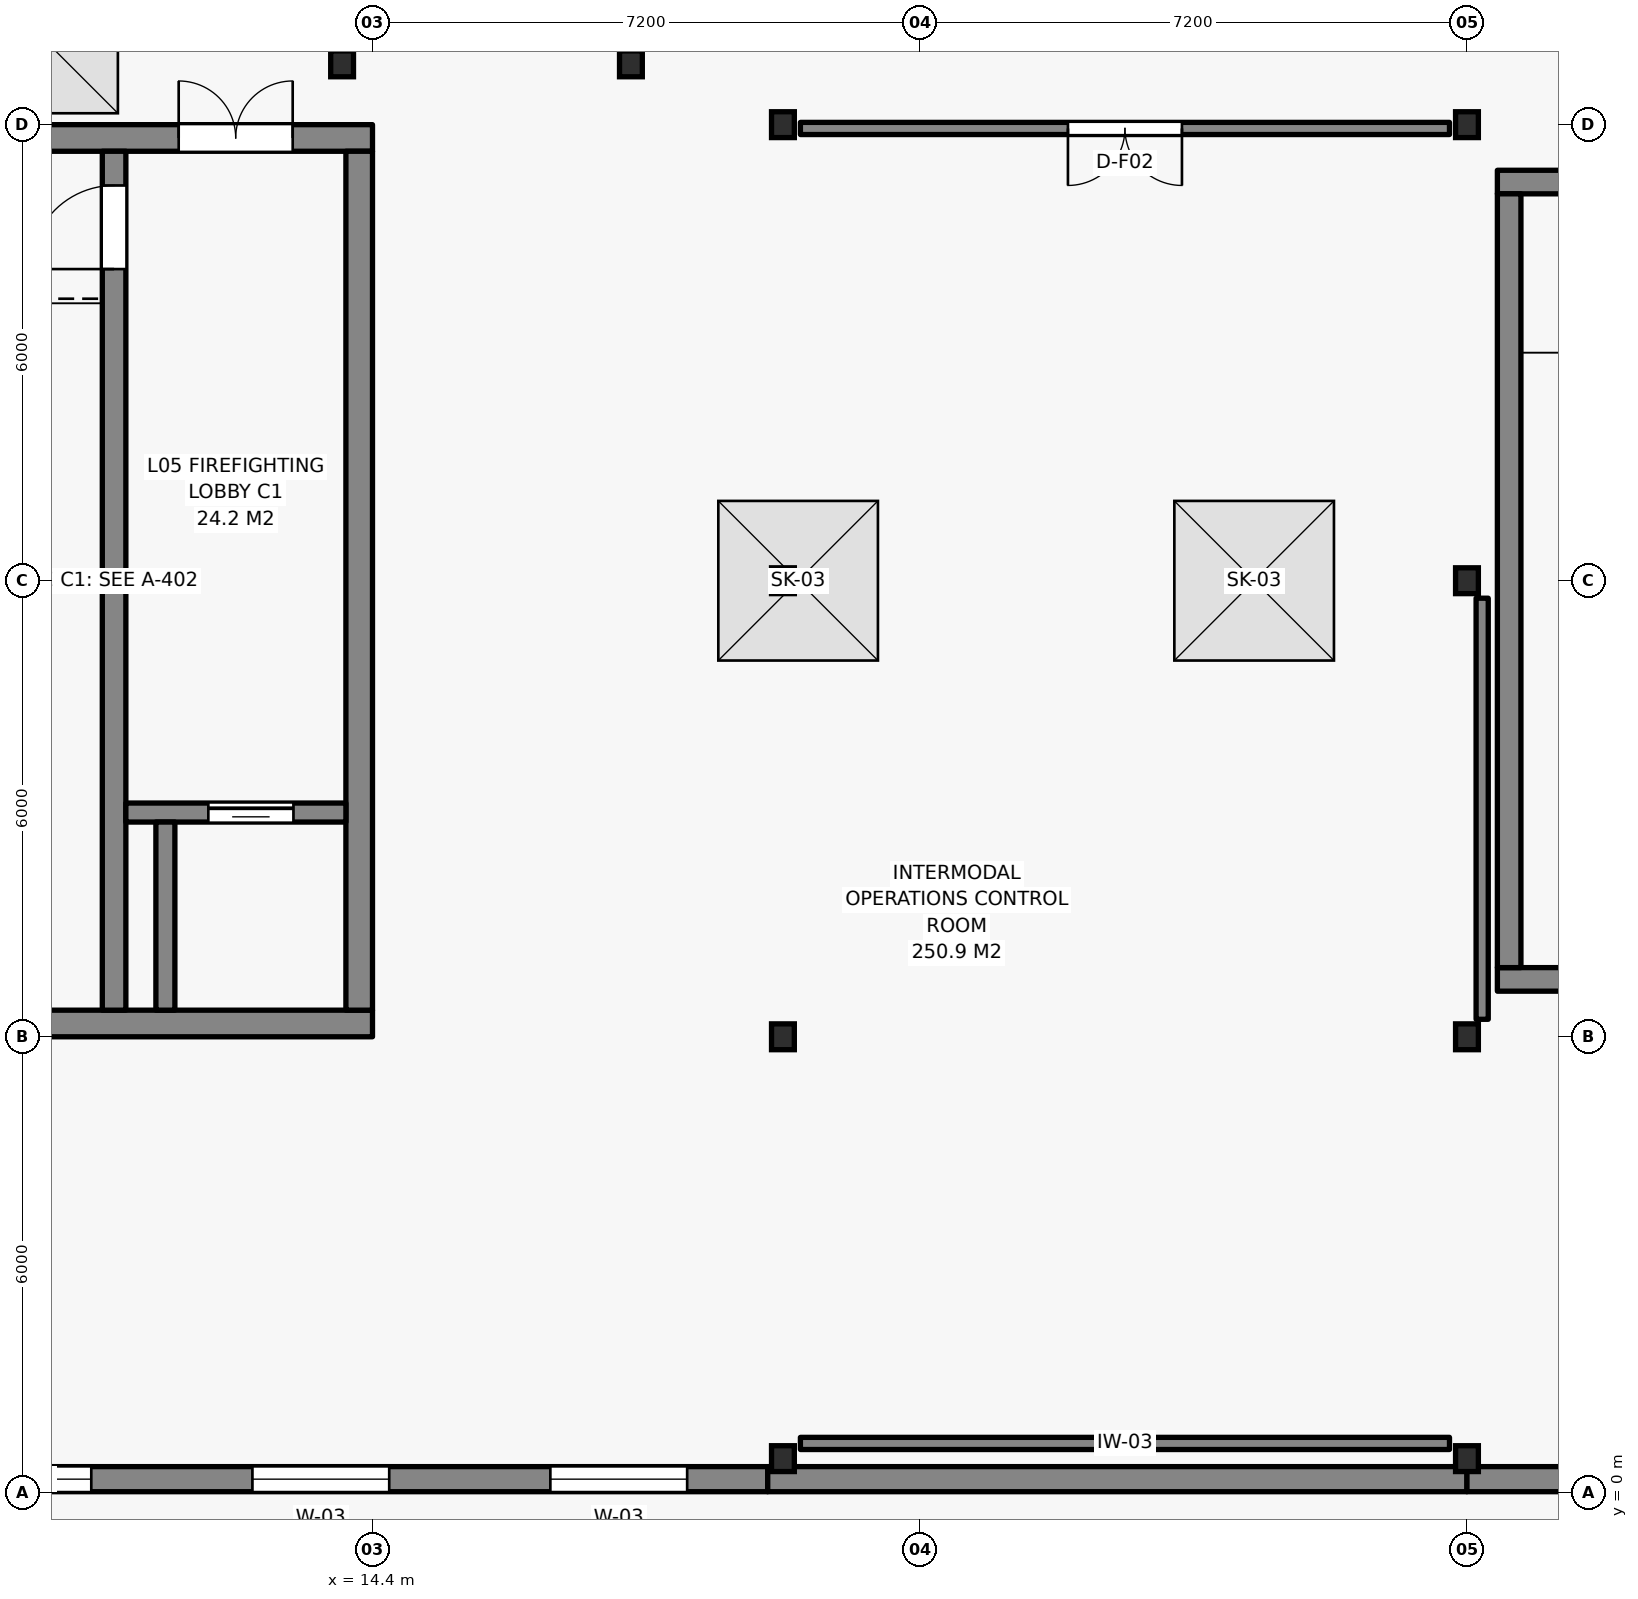
"""IFC4 building model, lengths in metres.
Left out: names, types, materials, properties, quantities, classifications, styles, units other than length and angle.
Written with IfcOpenShell. Run it as: python <this file> out.ifc"""

import sys

from ifc_helpers import new_model, si_unit, direction, frame, frame_2d, origin, origin_2d, place, context, subcontext, project, spatial, rectangle, i_section, extrude, element, fill, save


model = new_model("IFC4")
c1 = context("Model", 3, precision=1e-05, world=origin(), true_north=direction((0.0, 1.0)))
c2 = subcontext(c1, "Body", "Model", "MODEL_VIEW")
j1 = project(units=[si_unit("LENGTHUNIT", "METRE"), si_unit("PLANEANGLEUNIT", "RADIAN")], contexts=[c1])
p1 = place(None, origin())
s1 = spatial("IfcSite", under=j1, at=p1, CompositionType="ELEMENT")
p2 = place(p1, origin())
s2 = spatial("IfcBuilding", under=s1, at=p2, CompositionType="ELEMENT")
p3 = place(p2, frame((0.0, 0.0, 18.75)))
s3 = spatial("IfcBuildingStorey", under=s2, at=p3, CompositionType="ELEMENT", Elevation=18.75)
p4 = place(p3, frame((7.2, 6.175, 0.0), z_axis=(0.0, 0.0, 1.0), x_axis=(1.0, 0.0, 0.0)))
e1 = element("IfcWall", 1, at=p4, inside=s3, PredefinedType="SHEAR", context=c2, shape_type="SweptSolid", body=[
    extrude(rectangle(XDim=7.2, YDim=0.35, at=frame_2d((3.6, 0.0))), origin(), (0.0, 0.0, 1.0), 3.71),
])
p5 = place(p3, frame((7.2, 17.825, 0.0), z_axis=(0.0, 0.0, 1.0), x_axis=(1.0, 0.0, 0.0)))
e2 = element("IfcWall", 2, at=p5, inside=s3, PredefinedType="SHEAR", context=c2, shape_type="SweptSolid", body=[
    extrude(rectangle(XDim=7.2, YDim=0.35, at=frame_2d((3.6, 0.0))), origin(), (0.0, 0.0, 1.0), 3.71),
])
p6 = place(p5, frame((4.65, 0.0, 0.0)))
e3 = element("IfcOpeningElement", 3, at=p6, cuts=e2, PredefinedType="OPENING", context=c2, shape_type="SweptSolid", body=[
    extrude(rectangle(XDim=1.5, YDim=2.15, at=frame_2d((0.75, 1.075))), frame((0.0, 0.185, 0.0), z_axis=(0.0, -1.0, 0.0), x_axis=(1.0, 0.0, 0.0)), (0.0, 0.0, 1.0), 0.37),
])
p7 = place(p3, frame((14.225, 6.35, 0.0), z_axis=(0.0, 0.0, 1.0), x_axis=(0.0, 1.0, 0.0)))
e4 = element("IfcWall", 4, at=p7, inside=s3, PredefinedType="SHEAR", context=c2, shape_type="SweptSolid", body=[
    extrude(rectangle(XDim=11.3, YDim=0.35, at=frame_2d((5.65, 0.0))), origin(), (0.0, 0.0, 1.0), 3.71),
])
p8 = place(p3, frame((11.0, 6.35, 0.0), z_axis=(0.0, 0.0, 1.0), x_axis=(0.0, 1.0, 0.0)))
e5 = element("IfcWall", 5, at=p8, inside=s3, PredefinedType="SHEAR", context=c2, shape_type="SweptSolid", body=[
    extrude(rectangle(XDim=11.3, YDim=0.31, at=frame_2d((5.65, 0.0))), origin(), (0.0, 0.0, 1.0), 3.71),
])
p9 = place(p8, frame((9.75, 0.0, 0.0)))
e6 = element("IfcOpeningElement", 6, at=p9, cuts=e5, PredefinedType="OPENING", context=c2, shape_type="SweptSolid", body=[
    extrude(rectangle(XDim=1.1, YDim=2.15, at=frame_2d((0.55, 1.075))), frame((0.0, 0.165, 0.0), z_axis=(0.0, -1.0, 0.0), x_axis=(1.0, 0.0, 0.0)), (0.0, 0.0, 1.0), 0.33),
])
p10 = place(p3, frame((29.2, 6.755, 0.0), z_axis=(0.0, 0.0, 1.0), x_axis=(1.0, 0.0, 0.0)))
e7 = element("IfcWall", 7, at=p10, inside=s3, PredefinedType="SHEAR", context=c2, shape_type="SweptSolid", body=[
    extrude(rectangle(XDim=4.8, YDim=0.31, at=frame_2d((2.4, 0.0))), origin(), (0.0, 0.0, 1.0), 3.71),
])
p11 = place(p3, frame((29.2, 17.245, 0.0), z_axis=(0.0, 0.0, 1.0), x_axis=(1.0, 0.0, 0.0)))
e8 = element("IfcWall", 8, at=p11, inside=s3, PredefinedType="SHEAR", context=c2, shape_type="SweptSolid", body=[
    extrude(rectangle(XDim=4.8, YDim=0.31, at=frame_2d((2.4, 0.0))), origin(), (0.0, 0.0, 1.0), 3.71),
])
p12 = place(p11, frame((1.5, 0.0, 0.0)))
e9 = element("IfcOpeningElement", 9, at=p12, cuts=e8, PredefinedType="OPENING", context=c2, shape_type="SweptSolid", body=[
    extrude(rectangle(XDim=1.8, YDim=2.15, at=frame_2d((0.9, 1.075))), frame((0.0, 0.165, 0.0), z_axis=(0.0, -1.0, 0.0), x_axis=(1.0, 0.0, 0.0)), (0.0, 0.0, 1.0), 0.33),
])
p13 = place(p3, frame((29.355, 6.91, 0.0), z_axis=(0.0, 0.0, 1.0), x_axis=(0.0, 1.0, 0.0)))
e10 = element("IfcWall", 10, at=p13, inside=s3, PredefinedType="SHEAR", context=c2, shape_type="SweptSolid", body=[
    extrude(rectangle(XDim=10.18, YDim=0.31, at=frame_2d((5.09, 0.0))), origin(), (0.0, 0.0, 1.0), 3.71),
])
for number, where, z_axis, x_axis in (
    (11, (19.8, 0.45, 0.0), (0.0, 0.0, 1.0), (1.0, 0.0, 0.0)),
    (12, (19.8, 6.0, 0.0), (0.0, 0.0, 1.0), (1.0, 0.0, 0.0)),
    (13, (19.8, 12.0, 0.0), (0.0, 0.0, 1.0), (1.0, 0.0, 0.0)),
    (14, (19.8, 18.0, 0.0), (0.0, 0.0, 1.0), (1.0, 0.0, 0.0)),
    (15, (28.8, 0.45, 0.0), (0.0, 0.0, 1.0), (1.0, 0.0, 0.0)),
    (16, (28.8, 6.0, 0.0), (0.0, 0.0, 1.0), (1.0, 0.0, 0.0)),
    (17, (28.8, 12.0, 0.0), (0.0, 0.0, 1.0), (1.0, 0.0, 0.0)),
    (18, (28.8, 18.0, 0.0), (0.0, 0.0, 1.0), (1.0, 0.0, 0.0)),
    (19, (14.0, 18.8, 0.0), (0.0, 0.0, 1.0), (1.0, 0.0, 0.0)),
    (20, (17.8, 18.8, 0.0), (0.0, 0.0, 1.0), (1.0, 0.0, 0.0)),
):
    element("IfcColumn", number, at=place(p3, frame(where, z_axis=z_axis, x_axis=x_axis)), inside=s3, PredefinedType="COLUMN", context=c2, shape_type="SweptSolid", body=[
        extrude(i_section(OverallWidth=0.3, OverallDepth=0.34, WebThickness=0.012, FlangeThickness=0.021, FilletRadius=0.027, at=origin_2d()), origin(), (0.0, 0.0, 1.0), 3.71),
    ])
p14 = place(p3, frame((0.0, 0.18, 0.0), z_axis=(0.0, 0.0, 1.0), x_axis=(1.0, 0.0, 0.0)))
e21 = element("IfcWall", 21, at=p14, inside=s3, PredefinedType="SOLIDWALL", context=c2, shape_type="SweptSolid", body=[
    extrude(rectangle(XDim=19.6, YDim=0.33, at=frame_2d((9.8, 0.0))), origin(), (0.0, 0.0, 1.0), 3.505),
])
p15 = place(p14, frame((1.06, 0.0, 0.915)))
e22 = element("IfcOpeningElement", 22, at=p15, cuts=e21, PredefinedType="OPENING", context=c2, shape_type="SweptSolid", body=[
    extrude(rectangle(XDim=1.8, YDim=2.35, at=frame_2d((0.9, 1.175))), frame((0.0, 0.175, 0.0), z_axis=(0.0, -1.0, 0.0), x_axis=(1.0, 0.0, 0.0)), (0.0, 0.0, 1.0), 0.35),
])
p16 = place(p14, frame((8.9, 0.0, 0.915)))
e23 = element("IfcOpeningElement", 23, at=p16, cuts=e21, PredefinedType="OPENING", context=c2, shape_type="SweptSolid", body=[
    extrude(rectangle(XDim=1.8, YDim=2.35, at=frame_2d((0.9, 1.175))), frame((0.0, 0.175, 0.0), z_axis=(0.0, -1.0, 0.0), x_axis=(1.0, 0.0, 0.0)), (0.0, 0.0, 1.0), 0.35),
])
p17 = place(p14, frame((12.82, 0.0, 0.915)))
e24 = element("IfcOpeningElement", 24, at=p17, cuts=e21, PredefinedType="OPENING", context=c2, shape_type="SweptSolid", body=[
    extrude(rectangle(XDim=1.8, YDim=2.35, at=frame_2d((0.9, 1.175))), frame((0.0, 0.175, 0.0), z_axis=(0.0, -1.0, 0.0), x_axis=(1.0, 0.0, 0.0)), (0.0, 0.0, 1.0), 0.35),
])
p18 = place(p14, frame((16.74, 0.0, 0.915)))
e25 = element("IfcOpeningElement", 25, at=p18, cuts=e21, PredefinedType="OPENING", context=c2, shape_type="SweptSolid", body=[
    extrude(rectangle(XDim=1.8, YDim=2.35, at=frame_2d((0.9, 1.175))), frame((0.0, 0.175, 0.0), z_axis=(0.0, -1.0, 0.0), x_axis=(1.0, 0.0, 0.0)), (0.0, 0.0, 1.0), 0.35),
])
p19 = place(p3, frame((19.6, 0.18, 0.0), z_axis=(0.0, 0.0, 1.0), x_axis=(1.0, 0.0, 0.0)))
e26 = element("IfcWall", 26, at=p19, inside=s3, PredefinedType="SOLIDWALL", context=c2, shape_type="SweptSolid", body=[
    extrude(rectangle(XDim=9.2, YDim=0.33, at=frame_2d((4.6, 0.0))), origin(), (0.0, 0.0, 1.0), 3.205),
])
p20 = place(p3, frame((28.8, 0.18, 0.0), z_axis=(0.0, 0.0, 1.0), x_axis=(1.0, 0.0, 0.0)))
e27 = element("IfcWall", 27, at=p20, inside=s3, PredefinedType="SOLIDWALL", context=c2, shape_type="SweptSolid", body=[
    extrude(rectangle(XDim=7.2, YDim=0.33, at=frame_2d((3.6, 0.0))), origin(), (0.0, 0.0, 1.0), 3.71),
])
p21 = place(p20, frame((2.7, 0.0, 1.12)))
e28 = element("IfcOpeningElement", 28, at=p21, cuts=e27, PredefinedType="OPENING", context=c2, shape_type="SweptSolid", body=[
    extrude(rectangle(XDim=1.8, YDim=2.35, at=frame_2d((0.9, 1.175))), frame((0.0, 0.175, 0.0), z_axis=(0.0, -1.0, 0.0), x_axis=(1.0, 0.0, 0.0)), (0.0, 0.0, 1.0), 0.35),
])
p22 = place(p3, frame((11.155, 8.95, 0.0), z_axis=(0.0, 0.0, 1.0), x_axis=(1.0, 0.0, 0.0)))
e29 = element("IfcWall", 29, at=p22, inside=s3, PredefinedType="SHEAR", context=c2, shape_type="SweptSolid", body=[
    extrude(rectangle(XDim=2.895, YDim=0.25, at=frame_2d((1.448, 0.0))), origin(), (0.0, 0.0, 1.0), 3.71),
])
p23 = place(p22, frame((1.085, 0.0, 0.0)))
e30 = element("IfcOpeningElement", 30, at=p23, cuts=e29, PredefinedType="OPENING", context=c2, shape_type="SweptSolid", body=[
    extrude(rectangle(XDim=1.12, YDim=2.15, at=frame_2d((0.56, 1.075))), frame((0.0, 0.135, 0.0), z_axis=(0.0, -1.0, 0.0), x_axis=(1.0, 0.0, 0.0)), (0.0, 0.0, 1.0), 0.27),
])
p24 = place(p3, frame((11.675, 6.35, 0.0), z_axis=(0.0, 0.0, 1.0), x_axis=(0.0, 1.0, 0.0)))
e31 = element("IfcWall", 31, at=p24, inside=s3, PredefinedType="SHEAR", context=c2, shape_type="SweptSolid", body=[
    extrude(rectangle(XDim=2.475, YDim=0.25, at=frame_2d((1.237, 0.0))), origin(), (0.0, 0.0, 1.0), 3.71),
])
p25 = place(p3, frame((20.03, 0.65, 0.0), z_axis=(0.0, 0.0, 1.0), x_axis=(1.0, 0.0, 0.0)))
e32 = element("IfcWall", 32, at=p25, inside=s3, PredefinedType="PARTITIONING", context=c2, shape_type="SweptSolid", body=[
    extrude(rectangle(XDim=8.54, YDim=0.16, at=frame_2d((4.27, 0.0))), origin(), (0.0, 0.0, 1.0), 3.205),
])
p26 = place(p3, frame((29.0, 6.23, 0.0), z_axis=(0.0, 0.0, 1.0), x_axis=(0.0, 1.0, 0.0)))
e33 = element("IfcWall", 33, at=p26, inside=s3, PredefinedType="PARTITIONING", context=c2, shape_type="SweptSolid", body=[
    extrude(rectangle(XDim=5.54, YDim=0.16, at=frame_2d((2.77, 0.0))), origin(), (0.0, 0.0, 1.0), 3.205),
])
p27 = place(p3, frame((28.57, 17.95, 0.0), z_axis=(0.0, 0.0, 1.0), x_axis=(-1.0, 0.0, 0.0)))
e34 = element("IfcWall", 34, at=p27, inside=s3, PredefinedType="PARTITIONING", context=c2, shape_type="SweptSolid", body=[
    extrude(rectangle(XDim=8.54, YDim=0.16, at=frame_2d((4.27, 0.0))), origin(), (0.0, 0.0, 1.0), 3.205),
])
p28 = place(p27, frame((3.52, 0.0, 0.0)))
e35 = element("IfcOpeningElement", 35, at=p28, cuts=e34, PredefinedType="OPENING", context=c2, shape_type="SweptSolid", body=[
    extrude(rectangle(XDim=1.5, YDim=2.15, at=frame_2d((0.75, 1.075))), frame((0.0, 0.09, 0.0), z_axis=(0.0, -1.0, 0.0), x_axis=(1.0, 0.0, 0.0)), (0.0, 0.0, 1.0), 0.18),
])
p29 = place(p16, origin())
e36 = element("IfcWindow", 36, at=p29, inside=s3, PartitioningType="SINGLE_PANEL", PredefinedType="WINDOW", context=c2, shape_type="SweptSolid", body=[
    extrude(rectangle(XDim=1.8, YDim=2.35, at=frame_2d((0.9, 1.175))), frame((0.0, 0.03, 0.0), z_axis=(0.0, -1.0, 0.0), x_axis=(1.0, 0.0, 0.0)), (0.0, 0.0, 1.0), 0.06),
])
fill(e23, e36)
p30 = place(p17, origin())
e37 = element("IfcWindow", 37, at=p30, inside=s3, PartitioningType="SINGLE_PANEL", PredefinedType="WINDOW", context=c2, shape_type="SweptSolid", body=[
    extrude(rectangle(XDim=1.8, YDim=2.35, at=frame_2d((0.9, 1.175))), frame((0.0, 0.03, 0.0), z_axis=(0.0, -1.0, 0.0), x_axis=(1.0, 0.0, 0.0)), (0.0, 0.0, 1.0), 0.06),
])
fill(e24, e37)
p31 = place(p18, origin())
e38 = element("IfcWindow", 38, at=p31, inside=s3, PartitioningType="SINGLE_PANEL", PredefinedType="WINDOW", context=c2, shape_type="SweptSolid", body=[
    extrude(rectangle(XDim=1.8, YDim=2.35, at=frame_2d((0.9, 1.175))), frame((0.0, 0.03, 0.0), z_axis=(0.0, -1.0, 0.0), x_axis=(1.0, 0.0, 0.0)), (0.0, 0.0, 1.0), 0.06),
])
fill(e25, e38)
p32 = place(p3, frame((0.0, 0.0, 3.71)))
p33 = place(p32, frame((10.0, 19.2, 0.0)))
p34 = place(p33, frame((0.0, 0.0, 0.29)))
e39 = element("IfcWindow", 39, at=p34, inside=s3, PartitioningType="SINGLE_PANEL", PredefinedType="SKYLIGHT", context=c2, shape_type="SweptSolid", body=[
    extrude(rectangle(XDim=2.1, YDim=2.1, at=origin_2d()), origin(), (0.0, 0.0, 1.0), 0.05),
])
p35 = place(p32, frame((20.0, 12.0, 0.0)))
p36 = place(p35, frame((0.0, 0.0, 0.29)))
e40 = element("IfcWindow", 40, at=p36, inside=s3, PartitioningType="SINGLE_PANEL", PredefinedType="SKYLIGHT", context=c2, shape_type="SweptSolid", body=[
    extrude(rectangle(XDim=2.1, YDim=2.1, at=origin_2d()), origin(), (0.0, 0.0, 1.0), 0.05),
])
p37 = place(p32, frame((26.0, 12.0, 0.0)))
p38 = place(p37, frame((0.0, 0.0, 0.29)))
e41 = element("IfcWindow", 41, at=p38, inside=s3, PartitioningType="SINGLE_PANEL", PredefinedType="SKYLIGHT", context=c2, shape_type="SweptSolid", body=[
    extrude(rectangle(XDim=2.1, YDim=2.1, at=origin_2d()), origin(), (0.0, 0.0, 1.0), 0.05),
])
p39 = place(p23, origin())
e42 = element("IfcDoor", 42, at=p39, inside=s3, OperationType="SLIDING_TO_LEFT", PredefinedType="DOOR", context=c2, shape_type="SweptSolid", body=[
    extrude(rectangle(XDim=1.12, YDim=2.15, at=frame_2d((0.56, 1.075))), frame((0.0, 0.025, 0.0), z_axis=(0.0, -1.0, 0.0), x_axis=(1.0, 0.0, 0.0)), (0.0, 0.0, 1.0), 0.05),
])
fill(e30, e42)
p40 = place(p6, origin())
e43 = element("IfcDoor", 43, at=p40, inside=s3, OperationType="DOUBLE_DOOR_SINGLE_SWING", PredefinedType="DOOR", context=c2, shape_type="SweptSolid", body=[
    extrude(rectangle(XDim=1.5, YDim=2.15, at=frame_2d((0.75, 1.075))), frame((0.0, 0.025, 0.0), z_axis=(0.0, -1.0, 0.0), x_axis=(1.0, 0.0, 0.0)), (0.0, 0.0, 1.0), 0.05),
])
fill(e3, e43)
p41 = place(p9, origin())
e44 = element("IfcDoor", 44, at=p41, inside=s3, OperationType="SINGLE_SWING_LEFT", PredefinedType="DOOR", context=c2, shape_type="SweptSolid", body=[
    extrude(rectangle(XDim=1.1, YDim=2.15, at=frame_2d((0.55, 1.075))), frame((0.0, 0.025, 0.0), z_axis=(0.0, -1.0, 0.0), x_axis=(1.0, 0.0, 0.0)), (0.0, 0.0, 1.0), 0.05),
])
fill(e6, e44)
p42 = place(p28, origin())
e45 = element("IfcDoor", 45, at=p42, inside=s3, OperationType="DOUBLE_DOOR_SINGLE_SWING", PredefinedType="DOOR", context=c2, shape_type="SweptSolid", body=[
    extrude(rectangle(XDim=1.5, YDim=2.15, at=frame_2d((0.75, 1.075))), frame((0.0, 0.025, 0.0), z_axis=(0.0, -1.0, 0.0), x_axis=(1.0, 0.0, 0.0)), (0.0, 0.0, 1.0), 0.05),
])
fill(e35, e45)
save(model, sys.argv[1])
